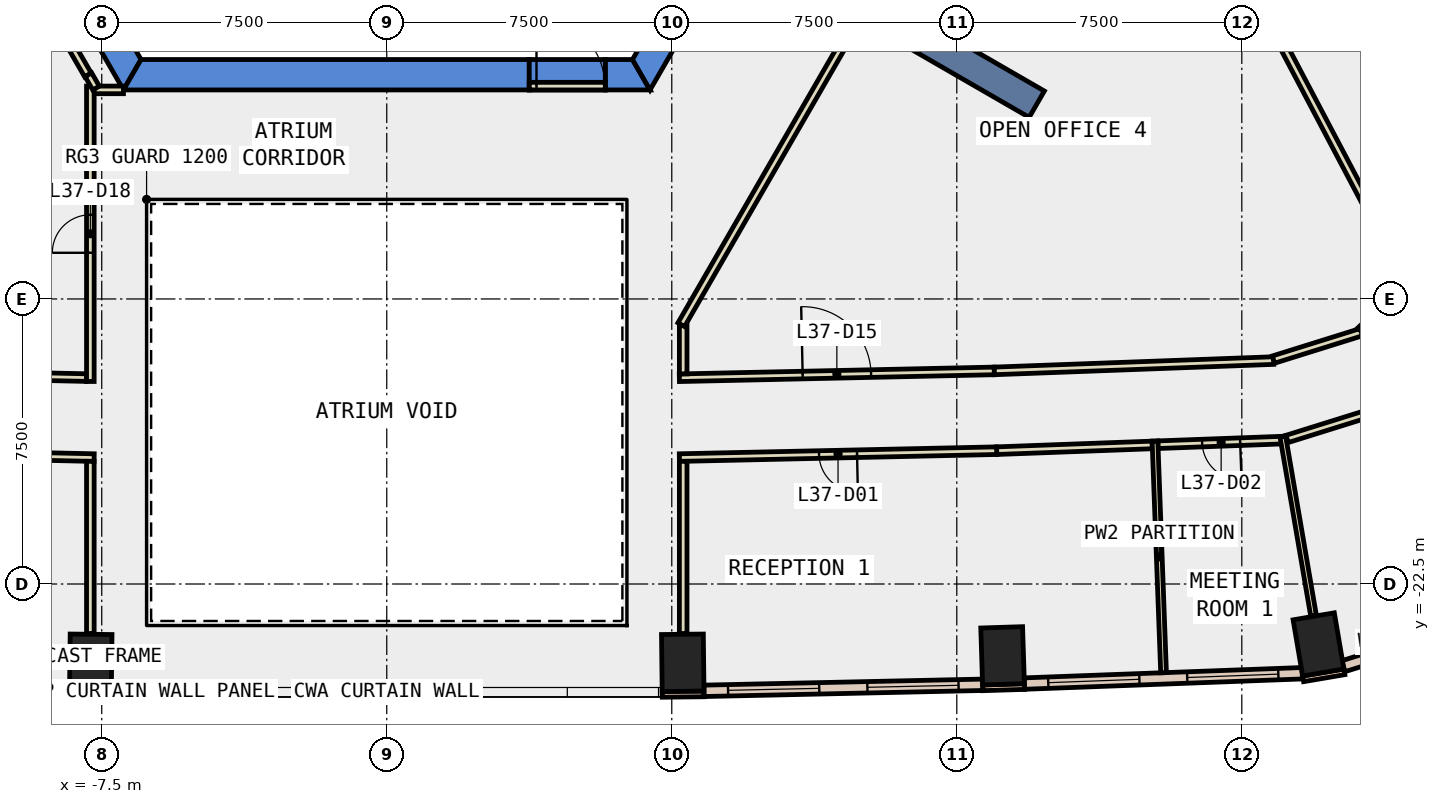
"""IFC4 building model, lengths in metres.
Left out: names, types, materials, properties, quantities, classifications, styles, units other than length and angle.
Written with IfcOpenShell. Run it as: python <this file> out.ifc"""

import sys

from ifc_helpers import new_model, si_unit, direction, frame, frame_2d, origin, origin_2d, place, context, subcontext, project, spatial, polyline, rectangle, outline, extrude, element, fill, save


model = new_model("IFC4")
c1 = context("Model", 3, precision=1e-05, world=origin(), true_north=direction((0.0, 1.0)))
c2 = subcontext(c1, "Body", "Model", "MODEL_VIEW")
j1 = project(units=[si_unit("LENGTHUNIT", "METRE"), si_unit("PLANEANGLEUNIT", "RADIAN")], contexts=[c1])
p1 = place(None, origin())
s1 = spatial("IfcSite", under=j1, at=p1, CompositionType="ELEMENT")
p2 = place(p1, origin())
s2 = spatial("IfcBuilding", under=s1, at=p2, CompositionType="ELEMENT")
p3 = place(p2, frame((0.0, 0.0, 167.6)))
s3 = spatial("IfcBuildingStorey", under=s2, at=p3, CompositionType="ELEMENT", Elevation=167.6)
for number, where, z_axis, x_axis in (
    (1, (-7.789, -24.573, -0.4), (0.0, 0.0, 1.0), (-1.0, 0.012, 0.0)),
    (2, (7.789, -24.573, -0.4), (0.0, 0.0, 1.0), (1.0, 0.012, 0.0)),
    (3, (16.205, -24.39, -0.4), (0.0, 0.0, 1.0), (0.999, 0.032, 0.0)),
    (4, (24.518, -24.09, -0.4), (0.0, 0.0, 1.0), (0.986, 0.168, 0.0)),
):
    element("IfcColumn", number, at=place(p3, frame(where, z_axis=z_axis, x_axis=x_axis)), inside=s3, PredefinedType="COLUMN", context=c2, shape_type="SweptSolid", body=[
        extrude(rectangle(XDim=1.1, YDim=1.5, at=origin_2d()), origin(), (0.0, 0.0, 1.0), 4.2),
    ])
p4 = place(p3, frame((0.0, 0.0, -0.4)))
e5 = element("IfcWall", 5, at=p4, inside=s3, PredefinedType="SHEAR", context=c2, shape_type="SweptSolid", body=[
    extrude(outline(polyline([(-13.856, 2.5), (-6.928, -9.5), (-6.466, -8.7), (-12.933, 2.5), (-13.856, 2.5)])), origin(), (0.0, 0.0, 1.0), 4.2),
])
p5 = place(p3, frame((0.0, 0.0, -0.4)))
e6 = element("IfcWall", 6, at=p5, inside=s3, PredefinedType="SHEAR", context=c2, shape_type="SweptSolid", body=[
    extrude(outline(polyline([(3.75, -9.5), (3.75, -8.7), (-6.466, -8.7), (-6.928, -9.5), (3.75, -9.5)])), origin(), (0.0, 0.0, 1.0), 4.2),
])
p6 = place(p3, frame((0.0, 0.0, -0.4)))
e7 = element("IfcWall", 7, at=p6, inside=s3, PredefinedType="SHEAR", context=c2, shape_type="SweptSolid", body=[
    extrude(outline(polyline([(5.75, -8.7), (5.75, -9.5), (6.928, -9.5), (6.466, -8.7), (5.75, -8.7)])), origin(), (0.0, 0.0, 1.0), 4.2),
])
p7 = place(p3, frame((0.0, 0.0, 3.6)))
e8 = element("IfcWall", 8, at=p7, inside=s3, PredefinedType="SHEAR", context=c2, shape_type="SweptSolid", body=[
    extrude(outline(polyline([(5.75, -9.5), (5.75, -8.7), (3.75, -8.7), (3.75, -9.5), (5.75, -9.5)])), origin(), (0.0, 0.0, 1.0), 0.2),
])
p8 = place(p3, frame((0.0, 0.0, -0.4)))
e9 = element("IfcWall", 9, at=p8, inside=s3, PredefinedType="SHEAR", context=c2, shape_type="SweptSolid", body=[
    extrude(outline(polyline([(8.117, -7.44), (7.424, -7.04), (6.466, -8.7), (6.928, -9.5), (8.117, -7.44)])), origin(), (0.0, 0.0, 1.0), 4.2),
])
p9 = place(p3, frame((9.31, -5.375, -0.4), z_axis=(0.0, 0.0, 1.0), x_axis=(0.866017533419, -0.500013631625, 0.0)))
e10 = element("IfcWall", 10, at=p9, inside=s3, PredefinedType="SHEAR", context=c2, shape_type="SweptSolid", body=[
    extrude(rectangle(XDim=9.0, YDim=0.8, at=frame_2d((4.5, 0.0))), origin(), (0.0, 0.0, 1.0), 4.2),
])
for number, where, z_axis, x_axis in (
    (11, (-8.349, -25.392, 0.0), (0.0, 0.0, 1.0), (1.0, -0.011, 0.0)),
    (12, (7.249, -25.404, 0.0), (0.0, 0.0, 1.0), (1.0, 0.011, 0.0)),
):
    element("IfcWall", number, at=place(p3, frame(where, z_axis=z_axis, x_axis=x_axis)), inside=s3, PredefinedType="STANDARD", context=c2, shape_type="SweptSolid", body=[
        extrude(rectangle(XDim=1.1, YDim=0.15, at=frame_2d((0.55, 0.0))), origin(), (0.0, 0.0, 1.0), 3.8),
    ])
p10 = place(p3, frame((15.682, -25.232, 0.0), z_axis=(0.0, 0.0, 1.0), x_axis=(0.999523702549, 0.030860460829, 0.0)))
e13 = element("IfcWall", 13, at=p10, inside=s3, PredefinedType="STANDARD", context=c2, shape_type="SweptSolid", body=[
    extrude(rectangle(XDim=1.1, YDim=0.15, at=frame_2d((0.55, 0.0))), origin(), (0.0, 0.0, 1.0), 3.8),
])
p11 = place(p3, frame((24.114, -24.996, 0.0), z_axis=(0.0, 0.0, 1.0), x_axis=(0.985763338892, 0.168138751323, 0.0)))
e14 = element("IfcWall", 14, at=p11, inside=s3, PredefinedType="STANDARD", context=c2, shape_type="SweptSolid", body=[
    extrude(rectangle(XDim=1.101, YDim=0.15, at=frame_2d((0.55, 0.0))), origin(), (0.0, 0.0, 1.0), 3.8),
])
p12 = place(p3, frame((-15.68, -25.152, 0.0), z_axis=(0.0, 0.0, 1.0), x_axis=(0.999765201774, -0.021668902196, 0.0)))
e15 = element("IfcWall", 15, at=p12, inside=s3, PredefinedType="STANDARD", context=c2, shape_type="SweptSolid", body=[
    extrude(rectangle(XDim=7.335, YDim=0.3, at=frame_2d((3.667, 0.0))), origin(), (0.0, 0.0, 1.0), 3.8),
])
p13 = place(p12, frame((0.634, 0.0, 0.9)))
e16 = element("IfcOpeningElement", 16, at=p13, cuts=e15, PredefinedType="OPENING", context=c2, shape_type="SweptSolid", body=[
    extrude(rectangle(XDim=2.4, YDim=2.6, at=frame_2d((1.2, 1.3))), frame((0.0, 0.16, 0.0), z_axis=(0.0, -1.0, 0.0), x_axis=(1.0, 0.0, 0.0)), (0.0, 0.0, 1.0), 0.32),
])
p14 = place(p12, frame((4.301, 0.0, 0.9)))
e17 = element("IfcOpeningElement", 17, at=p14, cuts=e15, PredefinedType="OPENING", context=c2, shape_type="SweptSolid", body=[
    extrude(rectangle(XDim=2.4, YDim=2.6, at=frame_2d((1.2, 1.3))), frame((0.0, 0.16, 0.0), z_axis=(0.0, -1.0, 0.0), x_axis=(1.0, 0.0, 0.0)), (0.0, 0.0, 1.0), 0.32),
])
p15 = place(p3, frame((8.347, -25.311, 0.0), z_axis=(0.0, 0.0, 1.0), x_axis=(0.999765201774, 0.021668902196, 0.0)))
e18 = element("IfcWall", 18, at=p15, inside=s3, PredefinedType="STANDARD", context=c2, shape_type="SweptSolid", body=[
    extrude(rectangle(XDim=7.335, YDim=0.3, at=frame_2d((3.667, 0.0))), origin(), (0.0, 0.0, 1.0), 3.8),
])
p16 = place(p15, frame((0.634, 0.0, 0.9)))
e19 = element("IfcOpeningElement", 19, at=p16, cuts=e18, PredefinedType="OPENING", context=c2, shape_type="SweptSolid", body=[
    extrude(rectangle(XDim=2.4, YDim=2.6, at=frame_2d((1.2, 1.3))), frame((0.0, 0.16, 0.0), z_axis=(0.0, -1.0, 0.0), x_axis=(1.0, 0.0, 0.0)), (0.0, 0.0, 1.0), 0.32),
])
p17 = place(p15, frame((4.301, 0.0, 0.9)))
e20 = element("IfcOpeningElement", 20, at=p17, cuts=e18, PredefinedType="OPENING", context=c2, shape_type="SweptSolid", body=[
    extrude(rectangle(XDim=2.4, YDim=2.6, at=frame_2d((1.2, 1.3))), frame((0.0, 0.16, 0.0), z_axis=(0.0, -1.0, 0.0), x_axis=(1.0, 0.0, 0.0)), (0.0, 0.0, 1.0), 0.32),
])
p18 = place(p3, frame((16.778, -25.12, 0.0), z_axis=(0.0, 0.0, 1.0), x_axis=(0.999307730926, 0.037202942236, 0.0)))
e21 = element("IfcWall", 21, at=p18, inside=s3, PredefinedType="STANDARD", context=c2, shape_type="SweptSolid", body=[
    extrude(rectangle(XDim=7.317, YDim=0.3, at=frame_2d((3.659, 0.0))), origin(), (0.0, 0.0, 1.0), 3.8),
])
p19 = place(p18, frame((0.629, 0.0, 0.9)))
e22 = element("IfcOpeningElement", 22, at=p19, cuts=e21, PredefinedType="OPENING", context=c2, shape_type="SweptSolid", body=[
    extrude(rectangle(XDim=2.4, YDim=2.6, at=frame_2d((1.2, 1.3))), frame((0.0, 0.16, 0.0), z_axis=(0.0, -1.0, 0.0), x_axis=(1.0, 0.0, 0.0)), (0.0, 0.0, 1.0), 0.32),
])
p20 = place(p18, frame((4.288, 0.0, 0.9)))
e23 = element("IfcOpeningElement", 23, at=p20, cuts=e21, PredefinedType="OPENING", context=c2, shape_type="SweptSolid", body=[
    extrude(rectangle(XDim=2.4, YDim=2.6, at=frame_2d((1.2, 1.3))), frame((0.0, 0.16, 0.0), z_axis=(0.0, -1.0, 0.0), x_axis=(1.0, 0.0, 0.0)), (0.0, 0.0, 1.0), 0.32),
])
p21 = place(p3, frame((25.172, -24.663, 0.0), z_axis=(0.0, 0.0, 1.0), x_axis=(0.954628614874, 0.29779893832, 0.0)))
e24 = element("IfcWall", 24, at=p21, inside=s3, PredefinedType="STANDARD", context=c2, shape_type="SweptSolid", body=[
    extrude(rectangle(XDim=4.322, YDim=0.3, at=frame_2d((2.161, 0.0))), origin(), (0.0, 0.0, 1.0), 3.8),
])
p22 = place(p21, frame((1.461, 0.0, 0.9)))
e25 = element("IfcOpeningElement", 25, at=p22, cuts=e24, PredefinedType="OPENING", context=c2, shape_type="SweptSolid", body=[
    extrude(rectangle(XDim=1.4, YDim=2.6, at=frame_2d((0.7, 1.3))), frame((0.0, 0.16, 0.0), z_axis=(0.0, -1.0, 0.0), x_axis=(1.0, 0.0, 0.0)), (0.0, 0.0, 1.0), 0.32),
])
p23 = place(p3, frame((7.7, -17.073, 0.0), z_axis=(0.0, 0.0, 1.0), x_axis=(0.999764372799, 0.021707115919, 0.0)))
e26 = element("IfcWall", 26, at=p23, inside=s3, PredefinedType="PARTITIONING", context=c2, shape_type="SweptSolid", body=[
    extrude(rectangle(XDim=8.289, YDim=0.2, at=frame_2d((4.145, 0.0))), origin(), (0.0, 0.0, 1.0), 3.8),
])
p24 = place(p23, frame((3.245, 0.0, 0.0)))
e27 = element("IfcOpeningElement", 27, at=p24, cuts=e26, PredefinedType="OPENING", context=c2, shape_type="SweptSolid", body=[
    extrude(rectangle(XDim=1.8, YDim=2.1, at=frame_2d((0.9, 1.05))), frame((0.0, 0.11, 0.0), z_axis=(0.0, -1.0, 0.0), x_axis=(1.0, 0.0, 0.0)), (0.0, 0.0, 1.0), 0.22),
])
p25 = place(p3, frame((15.987, -16.893, 0.0), z_axis=(0.0, 0.0, 1.0), x_axis=(0.999316060953, 0.036978511606, 0.0)))
e28 = element("IfcWall", 28, at=p25, inside=s3, PredefinedType="PARTITIONING", context=c2, shape_type="SweptSolid", body=[
    extrude(rectangle(XDim=7.355, YDim=0.2, at=frame_2d((3.677, 0.0))), origin(), (0.0, 0.0, 1.0), 3.8),
])
p26 = place(p3, frame((23.333, -16.595, 0.0), z_axis=(0.0, 0.0, 1.0), x_axis=(0.95454810771, 0.298056890655, 0.0)))
e29 = element("IfcWall", 29, at=p26, inside=s3, PredefinedType="PARTITIONING", context=c2, shape_type="SweptSolid", body=[
    extrude(rectangle(XDim=2.422, YDim=0.2, at=frame_2d((1.211, 0.0))), origin(), (0.0, 0.0, 1.0), 3.8),
])
p27 = place(p3, frame((25.622, -15.834, 0.0), z_axis=(0.0, 0.0, 1.0), x_axis=(0.725069777966, 0.688675407634, 0.0)))
e30 = element("IfcWall", 30, at=p27, inside=s3, PredefinedType="PARTITIONING", context=c2, shape_type="SweptSolid", body=[
    extrude(rectangle(XDim=1.04, YDim=0.2, at=frame_2d((0.52, 0.0))), origin(), (0.0, 0.0, 1.0), 3.8),
])
p28 = place(p3, frame((25.854, -12.635, 0.0), z_axis=(0.0, 0.0, 1.0), x_axis=(-0.466483047656, 0.884530138689, 0.0)))
e31 = element("IfcWall", 31, at=p28, inside=s3, PredefinedType="PARTITIONING", context=c2, shape_type="SweptSolid", body=[
    extrude(rectangle(XDim=6.487, YDim=0.2, at=frame_2d((3.244, 0.0))), origin(), (0.0, 0.0, 1.0), 3.8),
])
p29 = place(p3, frame((-11.278, -16.996, 0.0), z_axis=(0.0, 0.0, 1.0), x_axis=(0.999766613119, -0.021603687022, 0.0)))
e32 = element("IfcWall", 32, at=p29, inside=s3, PredefinedType="PARTITIONING", context=c2, shape_type="SweptSolid", body=[
    extrude(rectangle(XDim=3.379, YDim=0.2, at=frame_2d((1.689, 0.0))), origin(), (0.0, 0.0, 1.0), 3.8),
])
p30 = place(p3, frame((20.143, -18.841, 0.0), z_axis=(0.0, 0.0, 1.0), x_axis=(-0.999321592708, -0.036828716339, 0.0)))
e33 = element("IfcWall", 33, at=p30, inside=s3, PredefinedType="PARTITIONING", context=c2, shape_type="SweptSolid", body=[
    extrude(rectangle(XDim=4.097, YDim=0.2, at=frame_2d((2.048, 0.0))), origin(), (0.0, 0.0, 1.0), 3.8),
])
p31 = place(p3, frame((16.049, -18.992, 0.0), z_axis=(0.0, 0.0, 1.0), x_axis=(-0.999762156504, -0.021808952826, 0.0)))
e34 = element("IfcWall", 34, at=p31, inside=s3, PredefinedType="PARTITIONING", context=c2, shape_type="SweptSolid", body=[
    extrude(rectangle(XDim=8.351, YDim=0.2, at=frame_2d((4.176, 0.0))), origin(), (0.0, 0.0, 1.0), 3.8),
])
p32 = place(p31, frame((3.675, 0.0, 0.0)))
e35 = element("IfcOpeningElement", 35, at=p32, cuts=e34, PredefinedType="OPENING", context=c2, shape_type="SweptSolid", body=[
    extrude(rectangle(XDim=1.0, YDim=2.1, at=frame_2d((0.5, 1.05))), frame((0.0, 0.11, 0.0), z_axis=(0.0, -1.0, 0.0), x_axis=(1.0, 0.0, 0.0)), (0.0, 0.0, 1.0), 0.22),
])
p33 = place(p3, frame((23.62, -18.712, 0.0), z_axis=(0.0, 0.0, 1.0), x_axis=(-0.999316841287, -0.03695741767, 0.0)))
e36 = element("IfcWall", 36, at=p33, inside=s3, PredefinedType="PARTITIONING", context=c2, shape_type="SweptSolid", body=[
    extrude(rectangle(XDim=3.329, YDim=0.2, at=frame_2d((1.665, 0.0))), origin(), (0.0, 0.0, 1.0), 3.8),
])
p34 = place(p33, frame((1.165, 0.0, 0.0)))
e37 = element("IfcOpeningElement", 37, at=p34, cuts=e36, PredefinedType="OPENING", context=c2, shape_type="SweptSolid", body=[
    extrude(rectangle(XDim=1.0, YDim=2.1, at=frame_2d((0.5, 1.05))), frame((0.0, 0.11, 0.0), z_axis=(0.0, -1.0, 0.0), x_axis=(1.0, 0.0, 0.0)), (0.0, 0.0, 1.0), 0.22),
])
p35 = place(p3, frame((24.68, -5.906, 0.0), z_axis=(0.0, 0.0, 1.0), x_axis=(0.466450727507, -0.884547182918, 0.0)))
e38 = element("IfcWall", 38, at=p35, inside=s3, PredefinedType="PARTITIONING", context=c2, shape_type="SweptSolid", body=[
    extrude(rectangle(XDim=6.685, YDim=0.2, at=frame_2d((3.342, 0.0))), origin(), (0.0, 0.0, 1.0), 3.8),
])
p36 = place(p35, frame((2.842, 0.0, 0.0)))
e39 = element("IfcOpeningElement", 39, at=p36, cuts=e38, PredefinedType="OPENING", context=c2, shape_type="SweptSolid", body=[
    extrude(rectangle(XDim=1.0, YDim=2.1, at=frame_2d((0.5, 1.05))), frame((0.0, 0.11, 0.0), z_axis=(0.0, -1.0, 0.0), x_axis=(1.0, 0.0, 0.0)), (0.0, 0.0, 1.0), 0.22),
])
p37 = place(p3, frame((26.737, -17.732, 0.0), z_axis=(0.0, 0.0, 1.0), x_axis=(-0.954546657381, -0.298061535398, 0.0)))
e40 = element("IfcWall", 40, at=p37, inside=s3, PredefinedType="PARTITIONING", context=c2, shape_type="SweptSolid", body=[
    extrude(rectangle(XDim=3.191, YDim=0.2, at=frame_2d((1.596, 0.0))), origin(), (0.0, 0.0, 1.0), 3.8),
])
p38 = place(p3, frame((-7.7, -19.174, 0.0), z_axis=(0.0, 0.0, 1.0), x_axis=(-0.999762993889, 0.02177053169, 0.0)))
e41 = element("IfcWall", 41, at=p38, inside=s3, PredefinedType="PARTITIONING", context=c2, shape_type="SweptSolid", body=[
    extrude(rectangle(XDim=8.276, YDim=0.2, at=frame_2d((4.138, 0.0))), origin(), (0.0, 0.0, 1.0), 3.8),
])
p39 = place(p38, frame((3.713, 0.0, 0.0)))
e42 = element("IfcOpeningElement", 42, at=p39, cuts=e41, PredefinedType="OPENING", context=c2, shape_type="SweptSolid", body=[
    extrude(rectangle(XDim=1.0, YDim=2.1, at=frame_2d((0.5, 1.05))), frame((0.0, 0.11, 0.0), z_axis=(0.0, -1.0, 0.0), x_axis=(1.0, 0.0, 0.0)), (0.0, 0.0, 1.0), 0.22),
])
p40 = place(p3, frame((7.8, -15.69, 0.0), z_axis=(0.0, 0.0, 1.0), x_axis=(0.0, -1.0, 0.0)))
e43 = element("IfcWall", 43, at=p40, inside=s3, PredefinedType="PARTITIONING", context=c2, shape_type="SweptSolid", body=[
    extrude(rectangle(XDim=1.281, YDim=0.2, at=frame_2d((0.641, 0.0))), origin(), (0.0, 0.0, 1.0), 3.8),
])
p41 = place(p3, frame((-7.722, -9.499, 0.0), z_axis=(0.0, 0.0, 1.0), x_axis=(1.0, 0.0, 0.0)))
e44 = element("IfcWall", 44, at=p41, inside=s3, PredefinedType="PARTITIONING", context=c2, shape_type="SweptSolid", body=[
    extrude(rectangle(XDim=0.793, YDim=0.2, at=frame_2d((0.396, 0.0))), origin(), (0.0, 0.0, 1.0), 3.8),
])
p42 = place(p3, frame((-7.8, -17.171, 0.0), z_axis=(0.0, 0.0, 1.0), x_axis=(0.0, 1.0, 0.0)))
e45 = element("IfcWall", 45, at=p42, inside=s3, PredefinedType="PARTITIONING", context=c2, shape_type="SweptSolid", body=[
    extrude(rectangle(XDim=7.772, YDim=0.2, at=frame_2d((3.886, 0.0))), origin(), (0.0, 0.0, 1.0), 3.8),
])
p43 = place(p42, frame((3.386, 0.0, 0.0)))
e46 = element("IfcOpeningElement", 46, at=p43, cuts=e45, PredefinedType="OPENING", context=c2, shape_type="SweptSolid", body=[
    extrude(rectangle(XDim=1.0, YDim=2.1, at=frame_2d((0.5, 1.05))), frame((0.0, 0.11, 0.0), z_axis=(0.0, -1.0, 0.0), x_axis=(1.0, 0.0, 0.0)), (0.0, 0.0, 1.0), 0.22),
])
for number, where, z_axis, x_axis in (
    (47, (7.8, -19.272, 0.0), (0.0, 0.0, 1.0), (0.0, -1.0, 0.0)),
    (48, (-7.8, -23.803, 0.0), (0.0, 0.0, 1.0), (0.0, 1.0, 0.0)),
):
    element("IfcWall", number, at=place(p3, frame(where, z_axis=z_axis, x_axis=x_axis)), inside=s3, PredefinedType="PARTITIONING", context=c2, shape_type="SweptSolid", body=[
        extrude(rectangle(XDim=4.531, YDim=0.2, at=frame_2d((2.266, 0.0))), origin(), (0.0, 0.0, 1.0), 3.8),
    ])
p44 = place(p3, frame((-7.862, -9.107, 0.0), z_axis=(0.0, 0.0, 1.0), x_axis=(-0.499994038704, 0.866028845513, 0.0)))
e49 = element("IfcWall", 49, at=p44, inside=s3, PredefinedType="PARTITIONING", context=c2, shape_type="SweptSolid", body=[
    extrude(rectangle(XDim=2.568, YDim=0.2, at=frame_2d((1.284, 0.0))), origin(), (0.0, 0.0, 1.0), 3.8),
])
p45 = place(p3, frame((-7.65, -9.451, 0.0), z_axis=(0.0, 0.0, 1.0), x_axis=(-0.500297731093, 0.865853440406, 0.0)))
e50 = element("IfcWall", 50, at=p45, inside=s3, PredefinedType="PARTITIONING", context=c2, shape_type="SweptSolid", body=[
    extrude(rectangle(XDim=0.404, YDim=0.2, at=frame_2d((0.202, 0.0))), origin(), (0.0, 0.0, 1.0), 3.8),
])
p46 = place(p3, frame((20.215, -18.738, 0.0), z_axis=(0.0, 0.0, 1.0), x_axis=(0.037020542149, -0.999314504778, 0.0)))
e51 = element("IfcWall", 51, at=p46, inside=s3, PredefinedType="PARTITIONING", context=c2, shape_type="SweptSolid", body=[
    extrude(rectangle(XDim=6.1, YDim=0.15, at=frame_2d((3.05, 0.0))), origin(), (0.0, 0.0, 1.0), 3.8),
])
p47 = place(p3, frame((23.578, -18.614, 0.0), z_axis=(0.0, 0.0, 1.0), x_axis=(0.169054430835, -0.985606716401, 0.0)))
e52 = element("IfcWall", 52, at=p47, inside=s3, PredefinedType="PARTITIONING", context=c2, shape_type="SweptSolid", body=[
    extrude(rectangle(XDim=4.786, YDim=0.15, at=frame_2d((2.393, 0.0))), origin(), (0.0, 0.0, 1.0), 3.8),
])
p48 = place(p3, frame((3.75, -9.4, 0.0), z_axis=(0.0, 0.0, 1.0), x_axis=(1.0, 0.0, 0.0)))
e53 = element("IfcWall", 53, at=p48, inside=s3, PredefinedType="PARTITIONING", context=c2, shape_type="SweptSolid", body=[
    extrude(rectangle(XDim=2.0, YDim=0.2, at=frame_2d((1.0, 0.0))), origin(), (0.0, 0.0, 1.0), 2.4),
])
p49 = place(p48, frame((0.19, 0.0, 0.0)))
e54 = element("IfcOpeningElement", 54, at=p49, cuts=e53, PredefinedType="OPENING", context=c2, shape_type="SweptSolid", body=[
    extrude(rectangle(XDim=1.8, YDim=2.1, at=frame_2d((0.9, 1.05))), frame((0.0, 0.11, 0.0), z_axis=(0.0, -1.0, 0.0), x_axis=(1.0, 0.0, 0.0)), (0.0, 0.0, 1.0), 0.22),
])
p50 = place(p3, frame((12.401, -7.621, 0.0), z_axis=(0.0, 0.0, 1.0), x_axis=(-0.499983724212, -0.866034800411, 0.0)))
e55 = element("IfcWall", 55, at=p50, inside=s3, PredefinedType="PARTITIONING", context=c2, shape_type="SweptSolid", body=[
    extrude(rectangle(XDim=9.302, YDim=0.2, at=frame_2d((4.651, 0.0))), origin(), (0.0, 0.0, 1.0), 3.8),
])
p51 = place(p16, origin())
e56 = element("IfcWindow", 56, at=p51, inside=s3, PartitioningType="SINGLE_PANEL", PredefinedType="WINDOW", context=c2, shape_type="SweptSolid", body=[
    extrude(rectangle(XDim=2.4, YDim=2.6, at=frame_2d((1.2, 1.3))), frame((0.0, 0.03, 0.0), z_axis=(0.0, -1.0, 0.0), x_axis=(1.0, 0.0, 0.0)), (0.0, 0.0, 1.0), 0.06),
])
fill(e19, e56)
p52 = place(p17, origin())
e57 = element("IfcWindow", 57, at=p52, inside=s3, PartitioningType="SINGLE_PANEL", PredefinedType="WINDOW", context=c2, shape_type="SweptSolid", body=[
    extrude(rectangle(XDim=2.4, YDim=2.6, at=frame_2d((1.2, 1.3))), frame((0.0, 0.03, 0.0), z_axis=(0.0, -1.0, 0.0), x_axis=(1.0, 0.0, 0.0)), (0.0, 0.0, 1.0), 0.06),
])
fill(e20, e57)
p53 = place(p19, origin())
e58 = element("IfcWindow", 58, at=p53, inside=s3, PartitioningType="SINGLE_PANEL", PredefinedType="WINDOW", context=c2, shape_type="SweptSolid", body=[
    extrude(rectangle(XDim=2.4, YDim=2.6, at=frame_2d((1.2, 1.3))), frame((0.0, 0.03, 0.0), z_axis=(0.0, -1.0, 0.0), x_axis=(1.0, 0.0, 0.0)), (0.0, 0.0, 1.0), 0.06),
])
fill(e22, e58)
p54 = place(p20, origin())
e59 = element("IfcWindow", 59, at=p54, inside=s3, PartitioningType="SINGLE_PANEL", PredefinedType="WINDOW", context=c2, shape_type="SweptSolid", body=[
    extrude(rectangle(XDim=2.4, YDim=2.6, at=frame_2d((1.2, 1.3))), frame((0.0, 0.03, 0.0), z_axis=(0.0, -1.0, 0.0), x_axis=(1.0, 0.0, 0.0)), (0.0, 0.0, 1.0), 0.06),
])
fill(e23, e59)
p55 = place(p32, origin())
e60 = element("IfcDoor", 60, at=p55, inside=s3, OperationType="SINGLE_SWING_RIGHT", PredefinedType="DOOR", context=c2, shape_type="SweptSolid", body=[
    extrude(rectangle(XDim=1.0, YDim=2.1, at=frame_2d((0.5, 1.05))), frame((0.0, 0.025, 0.0), z_axis=(0.0, -1.0, 0.0), x_axis=(1.0, 0.0, 0.0)), (0.0, 0.0, 1.0), 0.05),
])
fill(e35, e60)
p56 = place(p34, origin())
e61 = element("IfcDoor", 61, at=p56, inside=s3, OperationType="SINGLE_SWING_LEFT", PredefinedType="DOOR", context=c2, shape_type="SweptSolid", body=[
    extrude(rectangle(XDim=1.0, YDim=2.1, at=frame_2d((0.5, 1.05))), frame((0.0, 0.025, 0.0), z_axis=(0.0, -1.0, 0.0), x_axis=(1.0, 0.0, 0.0)), (0.0, 0.0, 1.0), 0.05),
])
fill(e37, e61)
p57 = place(p24, origin())
e62 = element("IfcDoor", 62, at=p57, inside=s3, OperationType="DOUBLE_DOOR_SINGLE_SWING", PredefinedType="DOOR", context=c2, shape_type="SweptSolid", body=[
    extrude(rectangle(XDim=1.8, YDim=2.1, at=frame_2d((0.9, 1.05))), frame((0.0, 0.025, 0.0), z_axis=(0.0, -1.0, 0.0), x_axis=(1.0, 0.0, 0.0)), (0.0, 0.0, 1.0), 0.05),
])
fill(e27, e62)
p58 = place(p43, origin())
e63 = element("IfcDoor", 63, at=p58, inside=s3, OperationType="SINGLE_SWING_LEFT", PredefinedType="DOOR", context=c2, shape_type="SweptSolid", body=[
    extrude(rectangle(XDim=1.0, YDim=2.1, at=frame_2d((0.5, 1.05))), frame((0.0, 0.025, 0.0), z_axis=(0.0, -1.0, 0.0), x_axis=(1.0, 0.0, 0.0)), (0.0, 0.0, 1.0), 0.05),
])
fill(e46, e63)
p59 = place(p49, origin())
e64 = element("IfcDoor", 64, at=p59, inside=s3, OperationType="DOUBLE_DOOR_SINGLE_SWING", PredefinedType="DOOR", context=c2, shape_type="SweptSolid", body=[
    extrude(rectangle(XDim=1.8, YDim=2.1, at=frame_2d((0.9, 1.05))), frame((0.0, 0.025, 0.0), z_axis=(0.0, -1.0, 0.0), x_axis=(1.0, 0.0, 0.0)), (0.0, 0.0, 1.0), 0.05),
])
fill(e54, e64)
save(model, sys.argv[1])
